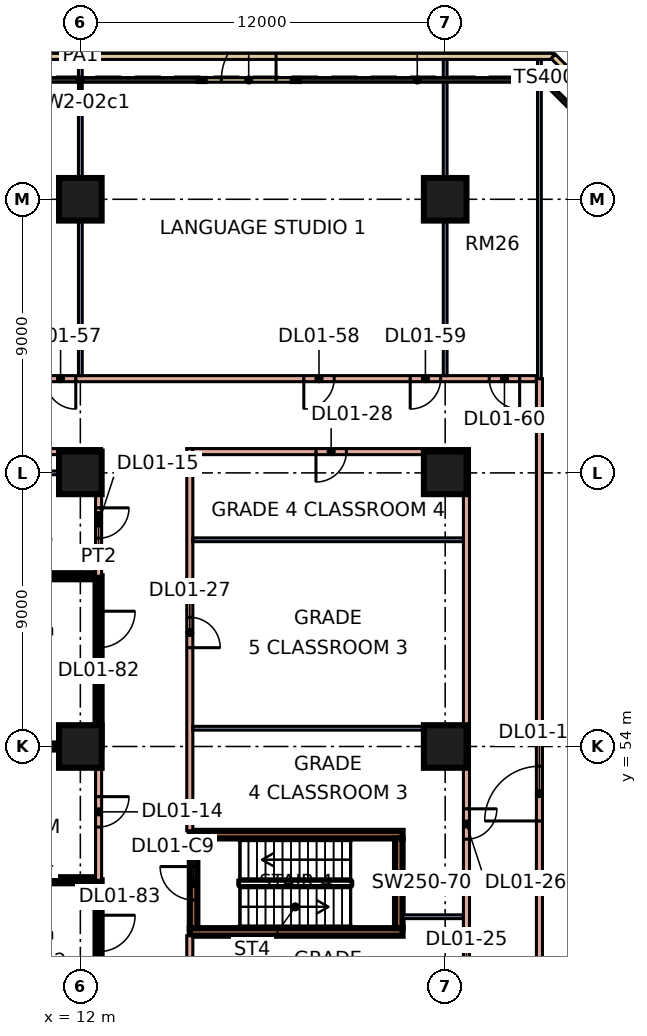
"""IFC4 building model, lengths in metres.
Left out: names, types, materials, properties, quantities, classifications, styles, units other than length and angle.
Written with IfcOpenShell. Run it as: python <this file> out.ifc"""

import sys

from ifc_helpers import new_model, si_unit, direction, frame, frame_2d, origin, origin_2d, place, context, subcontext, project, spatial, rectangle, extrude, element, fill, save


model = new_model("IFC4")
c1 = context("Model", 3, precision=1e-05, world=origin(), true_north=direction((0.0, 1.0)))
c2 = subcontext(c1, "Body", "Model", "MODEL_VIEW")
j1 = project(units=[si_unit("LENGTHUNIT", "METRE"), si_unit("PLANEANGLEUNIT", "RADIAN")], contexts=[c1])
p1 = place(None, origin())
s1 = spatial("IfcSite", under=j1, at=p1, CompositionType="ELEMENT")
p2 = place(p1, origin())
s2 = spatial("IfcBuilding", under=s1, at=p2, CompositionType="ELEMENT")
p3 = place(p2, frame((0.0, 0.0, 7.2)))
s3 = spatial("IfcBuildingStorey", under=s2, at=p3, CompositionType="ELEMENT", Elevation=7.2)
for number, where, z_axis, x_axis in (
    (1, (12.0, 54.0, 0.0), (0.0, 0.0, 1.0), (1.0, 0.0, 0.0)),
    (2, (24.0, 54.0, 0.0), (0.0, 0.0, 1.0), (1.0, 0.0, 0.0)),
    (3, (12.0, 63.0, 0.0), (0.0, 0.0, 1.0), (1.0, 0.0, 0.0)),
    (4, (24.0, 63.0, 0.0), (0.0, 0.0, 1.0), (1.0, 0.0, 0.0)),
    (5, (12.0, 72.0, 0.0), (0.0, 0.0, 1.0), (1.0, 0.0, 0.0)),
    (6, (24.0, 72.0, 0.0), (0.0, 0.0, 1.0), (1.0, 0.0, 0.0)),
):
    element("IfcColumn", number, at=place(p3, frame(where, z_axis=z_axis, x_axis=x_axis)), inside=s3, PredefinedType="COLUMN", context=c2, shape_type="SweptSolid", body=[
        extrude(rectangle(XDim=1.4, YDim=1.4, at=origin_2d()), origin(), (0.0, 0.0, 1.0), 4.8),
    ])
for number, where, z_axis, x_axis in (
    (7, (15.6, 47.9, 0.0), (0.0, 0.0, 1.0), (1.0, 0.0, 0.0)),
    (8, (15.6, 51.1, 0.0), (0.0, 0.0, 1.0), (1.0, 0.0, 0.0)),
):
    element("IfcWall", number, at=place(p3, frame(where, z_axis=z_axis, x_axis=x_axis)), inside=s3, PredefinedType="SHEAR", context=c2, shape_type="SweptSolid", body=[
        extrude(rectangle(XDim=7.0, YDim=0.25, at=frame_2d((3.5, 0.0))), origin(), (0.0, 0.0, 1.0), 4.8),
    ])
p4 = place(p3, frame((15.725, 48.025, 0.0), z_axis=(0.0, 0.0, 1.0), x_axis=(0.0, 1.0, 0.0)))
e9 = element("IfcWall", 9, at=p4, inside=s3, PredefinedType="SHEAR", context=c2, shape_type="SweptSolid", body=[
    extrude(rectangle(XDim=2.95, YDim=0.25, at=frame_2d((1.475, 0.0))), origin(), (0.0, 0.0, 1.0), 4.8),
])
p5 = place(p4, frame((0.925, 0.0, 0.0)))
e10 = element("IfcOpeningElement", 10, at=p5, cuts=e9, PredefinedType="OPENING", context=c2, shape_type="SweptSolid", body=[
    extrude(rectangle(XDim=1.1, YDim=2.2, at=frame_2d((0.55, 1.1))), frame((0.0, 0.135, 0.0), z_axis=(0.0, -1.0, 0.0), x_axis=(1.0, 0.0, 0.0)), (0.0, 0.0, 1.0), 0.27),
])
p6 = place(p3, frame((22.475, 48.025, 0.0), z_axis=(0.0, 0.0, 1.0), x_axis=(0.0, 1.0, 0.0)))
e11 = element("IfcWall", 11, at=p6, inside=s3, PredefinedType="SHEAR", context=c2, shape_type="SweptSolid", body=[
    extrude(rectangle(XDim=2.95, YDim=0.25, at=frame_2d((1.475, 0.0))), origin(), (0.0, 0.0, 1.0), 4.8),
])
p7 = place(p3, frame((19.038, 75.925, 0.0), z_axis=(0.0, 0.0, 1.0), x_axis=(-1.0, 0.0, 0.0)))
e12 = element("IfcWall", 12, at=p7, inside=s3, PredefinedType="SOLIDWALL", context=c2, shape_type="SweptSolid", body=[
    extrude(rectangle(XDim=3.0, YDim=0.15, at=frame_2d((1.5, 0.0))), origin(), (0.0, 0.0, 1.0), 4.4),
])
p8 = place(p7, frame((0.6, 0.0, 0.0)))
e13 = element("IfcOpeningElement", 13, at=p8, cuts=e12, PredefinedType="OPENING", context=c2, shape_type="SweptSolid", body=[
    extrude(rectangle(XDim=1.8, YDim=2.4, at=frame_2d((0.9, 1.2))), frame((0.0, 0.085, 0.0), z_axis=(0.0, -1.0, 0.0), x_axis=(1.0, 0.0, 0.0)), (0.0, 0.0, 1.0), 0.17),
])
p9 = place(p3, frame((-3.553, 76.7, 0.0), z_axis=(0.0, 0.0, 1.0), x_axis=(1.0, 0.0, 0.0)))
e14 = element("IfcWall", 14, at=p9, inside=s3, PredefinedType="PARAPET", context=c2, shape_type="SweptSolid", body=[
    extrude(rectangle(XDim=31.107, YDim=0.2, at=frame_2d((15.553, 0.0))), origin(), (0.0, 0.0, 1.0), 0.5),
])
p10 = place(p3, frame((27.553, 76.7, 0.0), z_axis=(0.0, 0.0, 1.0), x_axis=(0.707106781187, -0.707106781187, 0.0)))
e15 = element("IfcWall", 15, at=p10, inside=s3, PredefinedType="PARAPET", context=c2, shape_type="SweptSolid", body=[
    extrude(rectangle(XDim=12.021, YDim=0.2, at=frame_2d((6.01, 0.0))), origin(), (0.0, 0.0, 1.0), 0.5),
])
p11 = place(p3, frame((-3.0, 66.1, 0.0), z_axis=(0.0, 0.0, 1.0), x_axis=(1.0, 0.0, 0.0)))
e16 = element("IfcWall", 16, at=p11, inside=s3, PredefinedType="PARTITIONING", context=c2, shape_type="SweptSolid", body=[
    extrude(rectangle(XDim=30.0, YDim=0.2, at=frame_2d((15.0, 0.0))), origin(), (0.0, 0.0, 1.0), 4.4),
])
p12 = place(p11, frame((0.65, 0.0, 0.0)))
e17 = element("IfcOpeningElement", 17, at=p12, cuts=e16, PredefinedType="OPENING", context=c2, shape_type="SweptSolid", body=[
    extrude(rectangle(XDim=1.0, YDim=2.1, at=frame_2d((0.5, 1.05))), frame((0.0, 0.11, 0.0), z_axis=(0.0, -1.0, 0.0), x_axis=(1.0, 0.0, 0.0)), (0.0, 0.0, 1.0), 0.22),
])
p13 = place(p11, frame((8.6, 0.0, 0.0)))
e18 = element("IfcOpeningElement", 18, at=p13, cuts=e16, PredefinedType="OPENING", context=c2, shape_type="SweptSolid", body=[
    extrude(rectangle(XDim=1.0, YDim=2.1, at=frame_2d((0.5, 1.05))), frame((0.0, 0.11, 0.0), z_axis=(0.0, -1.0, 0.0), x_axis=(1.0, 0.0, 0.0)), (0.0, 0.0, 1.0), 0.22),
])
p14 = place(p11, frame((13.85, 0.0, 0.0)))
e19 = element("IfcOpeningElement", 19, at=p14, cuts=e16, PredefinedType="OPENING", context=c2, shape_type="SweptSolid", body=[
    extrude(rectangle(XDim=1.0, YDim=2.1, at=frame_2d((0.5, 1.05))), frame((0.0, 0.11, 0.0), z_axis=(0.0, -1.0, 0.0), x_axis=(1.0, 0.0, 0.0)), (0.0, 0.0, 1.0), 0.22),
])
p15 = place(p11, frame((22.35, 0.0, 0.0)))
e20 = element("IfcOpeningElement", 20, at=p15, cuts=e16, PredefinedType="OPENING", context=c2, shape_type="SweptSolid", body=[
    extrude(rectangle(XDim=1.0, YDim=2.1, at=frame_2d((0.5, 1.05))), frame((0.0, 0.11, 0.0), z_axis=(0.0, -1.0, 0.0), x_axis=(1.0, 0.0, 0.0)), (0.0, 0.0, 1.0), 0.22),
])
p16 = place(p11, frame((25.85, 0.0, 0.0)))
e21 = element("IfcOpeningElement", 21, at=p16, cuts=e16, PredefinedType="OPENING", context=c2, shape_type="SweptSolid", body=[
    extrude(rectangle(XDim=1.0, YDim=2.1, at=frame_2d((0.5, 1.05))), frame((0.0, 0.11, 0.0), z_axis=(0.0, -1.0, 0.0), x_axis=(1.0, 0.0, 0.0)), (0.0, 0.0, 1.0), 0.22),
])
p17 = place(p11, frame((28.45, 0.0, 0.0)))
e22 = element("IfcOpeningElement", 22, at=p17, cuts=e16, PredefinedType="OPENING", context=c2, shape_type="SweptSolid", body=[
    extrude(rectangle(XDim=1.0, YDim=2.1, at=frame_2d((0.5, 1.05))), frame((0.0, 0.11, 0.0), z_axis=(0.0, -1.0, 0.0), x_axis=(1.0, 0.0, 0.0)), (0.0, 0.0, 1.0), 0.22),
])
for number, where, z_axis, x_axis in (
    (23, (-0.6, 49.6, 0.0), (0.0, 0.0, 1.0), (1.0, 0.0, 0.0)),
    (24, (-0.6, 54.0, 0.0), (0.0, 0.0, 1.0), (1.0, 0.0, 0.0)),
    (25, (-0.6, 59.6, 0.0), (0.0, 0.0, 1.0), (1.0, 0.0, 0.0)),
):
    element("IfcWall", number, at=place(p3, frame(where, z_axis=z_axis, x_axis=x_axis)), inside=s3, PredefinedType="SOLIDWALL", context=c2, shape_type="SweptSolid", body=[
        extrude(rectangle(XDim=13.1, YDim=0.2, at=frame_2d((6.55, 0.0))), origin(), (0.0, 0.0, 1.0), 4.4),
    ])
p18 = place(p3, frame((-0.6, 63.7, 0.0), z_axis=(0.0, 0.0, 1.0), x_axis=(1.0, 0.0, 0.0)))
e26 = element("IfcWall", 26, at=p18, inside=s3, PredefinedType="PARTITIONING", context=c2, shape_type="SweptSolid", body=[
    extrude(rectangle(XDim=13.3, YDim=0.2, at=frame_2d((6.65, 0.0))), origin(), (0.0, 0.0, 1.0), 4.4),
])
p19 = place(p18, frame((6.05, 0.0, 0.0)))
e27 = element("IfcOpeningElement", 27, at=p19, cuts=e26, PredefinedType="OPENING", context=c2, shape_type="SweptSolid", body=[
    extrude(rectangle(XDim=1.0, YDim=2.1, at=frame_2d((0.5, 1.05))), frame((0.0, 0.11, 0.0), z_axis=(0.0, -1.0, 0.0), x_axis=(1.0, 0.0, 0.0)), (0.0, 0.0, 1.0), 0.22),
])
p20 = place(p3, frame((5.938, 63.0, 0.0), z_axis=(0.0, 0.0, 1.0), x_axis=(1.0, 0.0, 0.0)))
e28 = element("IfcWall", 28, at=p20, inside=s3, PredefinedType="PARTITIONING", context=c2, shape_type="SweptSolid", body=[
    extrude(rectangle(XDim=6.562, YDim=0.125, at=frame_2d((3.281, 0.0))), origin(), (0.0, 0.0, 1.0), 4.4),
])
p21 = place(p3, frame((12.0, 66.2, 0.0), z_axis=(0.0, 0.0, 1.0), x_axis=(0.0, 1.0, 0.0)))
e29 = element("IfcWall", 29, at=p21, inside=s3, PredefinedType="PARTITIONING", context=c2, shape_type="SweptSolid", body=[
    extrude(rectangle(XDim=10.4, YDim=0.125, at=frame_2d((5.2, 0.0))), origin(), (0.0, 0.0, 1.0), 4.4),
])
p22 = place(p3, frame((12.6, 45.0, 0.0), z_axis=(0.0, 0.0, 1.0), x_axis=(0.0, 1.0, 0.0)))
e30 = element("IfcWall", 30, at=p22, inside=s3, PredefinedType="SOLIDWALL", context=c2, shape_type="SweptSolid", body=[
    extrude(rectangle(XDim=4.6, YDim=0.2, at=frame_2d((2.3, 0.0))), origin(), (0.0, 0.0, 1.0), 4.4),
])
p23 = place(p22, frame((2.25, 0.0, 0.0)))
e31 = element("IfcOpeningElement", 31, at=p23, cuts=e30, PredefinedType="OPENING", context=c2, shape_type="SweptSolid", body=[
    extrude(rectangle(XDim=1.2, YDim=2.1, at=frame_2d((0.6, 1.05))), frame((0.0, 0.11, 0.0), z_axis=(0.0, -1.0, 0.0), x_axis=(1.0, 0.0, 0.0)), (0.0, 0.0, 1.0), 0.22),
])
p24 = place(p3, frame((12.6, 49.6, 0.0), z_axis=(0.0, 0.0, 1.0), x_axis=(0.0, 1.0, 0.0)))
e32 = element("IfcWall", 32, at=p24, inside=s3, PredefinedType="PARTITIONING", context=c2, shape_type="SweptSolid", body=[
    extrude(rectangle(XDim=4.4, YDim=0.2, at=frame_2d((2.2, 0.0))), origin(), (0.0, 0.0, 1.0), 4.4),
])
p25 = place(p24, frame((1.75, 0.0, 0.0)))
e33 = element("IfcOpeningElement", 33, at=p25, cuts=e32, PredefinedType="OPENING", context=c2, shape_type="SweptSolid", body=[
    extrude(rectangle(XDim=1.0, YDim=2.1, at=frame_2d((0.5, 1.05))), frame((0.0, 0.11, 0.0), z_axis=(0.0, -1.0, 0.0), x_axis=(1.0, 0.0, 0.0)), (0.0, 0.0, 1.0), 0.22),
])
p26 = place(p3, frame((12.6, 54.0, 0.0), z_axis=(0.0, 0.0, 1.0), x_axis=(0.0, 1.0, 0.0)))
e34 = element("IfcWall", 34, at=p26, inside=s3, PredefinedType="SOLIDWALL", context=c2, shape_type="SweptSolid", body=[
    extrude(rectangle(XDim=5.6, YDim=0.2, at=frame_2d((2.8, 0.0))), origin(), (0.0, 0.0, 1.0), 4.4),
])
p27 = place(p26, frame((3.25, 0.0, 0.0)))
e35 = element("IfcOpeningElement", 35, at=p27, cuts=e34, PredefinedType="OPENING", context=c2, shape_type="SweptSolid", body=[
    extrude(rectangle(XDim=1.2, YDim=2.1, at=frame_2d((0.6, 1.05))), frame((0.0, 0.11, 0.0), z_axis=(0.0, -1.0, 0.0), x_axis=(1.0, 0.0, 0.0)), (0.0, 0.0, 1.0), 0.22),
])
p28 = place(p3, frame((12.6, 59.6, 0.0), z_axis=(0.0, 0.0, 1.0), x_axis=(0.0, 1.0, 0.0)))
e36 = element("IfcWall", 36, at=p28, inside=s3, PredefinedType="PARTITIONING", context=c2, shape_type="SweptSolid", body=[
    extrude(rectangle(XDim=4.0, YDim=0.2, at=frame_2d((2.0, 0.0))), origin(), (0.0, 0.0, 1.0), 4.4),
])
p29 = place(p28, frame((1.25, 0.0, 0.0)))
e37 = element("IfcOpeningElement", 37, at=p29, cuts=e36, PredefinedType="OPENING", context=c2, shape_type="SweptSolid", body=[
    extrude(rectangle(XDim=1.0, YDim=2.1, at=frame_2d((0.5, 1.05))), frame((0.0, 0.11, 0.0), z_axis=(0.0, -1.0, 0.0), x_axis=(1.0, 0.0, 0.0)), (0.0, 0.0, 1.0), 0.22),
])
p30 = place(p3, frame((15.6, 44.2, 0.0), z_axis=(0.0, 0.0, 1.0), x_axis=(0.0, 1.0, 0.0)))
e38 = element("IfcWall", 38, at=p30, inside=s3, PredefinedType="PARTITIONING", context=c2, shape_type="SweptSolid", body=[
    extrude(rectangle(XDim=3.575, YDim=0.2, at=frame_2d((1.788, 0.0))), origin(), (0.0, 0.0, 1.0), 4.4),
])
p31 = place(p3, frame((15.6, 51.225, 0.0), z_axis=(0.0, 0.0, 1.0), x_axis=(0.0, 1.0, 0.0)))
e39 = element("IfcWall", 39, at=p31, inside=s3, PredefinedType="PARTITIONING", context=c2, shape_type="SweptSolid", body=[
    extrude(rectangle(XDim=12.575, YDim=0.2, at=frame_2d((6.288, 0.0))), origin(), (0.0, 0.0, 1.0), 4.4),
])
p32 = place(p31, frame((6.025, 0.0, 0.0)))
e40 = element("IfcOpeningElement", 40, at=p32, cuts=e39, PredefinedType="OPENING", context=c2, shape_type="SweptSolid", body=[
    extrude(rectangle(XDim=1.0, YDim=2.1, at=frame_2d((0.5, 1.05))), frame((0.0, 0.11, 0.0), z_axis=(0.0, -1.0, 0.0), x_axis=(1.0, 0.0, 0.0)), (0.0, 0.0, 1.0), 0.22),
])
for number, where, z_axis, x_axis in (
    (41, (15.7, 54.6, 0.0), (0.0, 0.0, 1.0), (1.0, 0.0, 0.0)),
    (42, (15.7, 60.8, 0.0), (0.0, 0.0, 1.0), (1.0, 0.0, 0.0)),
):
    element("IfcWall", number, at=place(p3, frame(where, z_axis=z_axis, x_axis=x_axis)), inside=s3, PredefinedType="PARTITIONING", context=c2, shape_type="SweptSolid", body=[
        extrude(rectangle(XDim=8.9, YDim=0.125, at=frame_2d((4.45, 0.0))), origin(), (0.0, 0.0, 1.0), 4.4),
    ])
p33 = place(p3, frame((15.7, 63.7, 0.0), z_axis=(0.0, 0.0, 1.0), x_axis=(1.0, 0.0, 0.0)))
e43 = element("IfcWall", 43, at=p33, inside=s3, PredefinedType="PARTITIONING", context=c2, shape_type="SweptSolid", body=[
    extrude(rectangle(XDim=8.9, YDim=0.2, at=frame_2d((4.45, 0.0))), origin(), (0.0, 0.0, 1.0), 4.4),
])
p34 = place(p33, frame((4.05, 0.0, 0.0)))
e44 = element("IfcOpeningElement", 44, at=p34, cuts=e43, PredefinedType="OPENING", context=c2, shape_type="SweptSolid", body=[
    extrude(rectangle(XDim=1.0, YDim=2.1, at=frame_2d((0.5, 1.05))), frame((0.0, 0.11, 0.0), z_axis=(0.0, -1.0, 0.0), x_axis=(1.0, 0.0, 0.0)), (0.0, 0.0, 1.0), 0.22),
])
p35 = place(p3, frame((22.6, 48.4, 0.0), z_axis=(0.0, 0.0, 1.0), x_axis=(1.0, 0.0, 0.0)))
e45 = element("IfcWall", 45, at=p35, inside=s3, PredefinedType="PARTITIONING", context=c2, shape_type="SweptSolid", body=[
    extrude(rectangle(XDim=2.0, YDim=0.125, at=frame_2d((1.0, 0.0))), origin(), (0.0, 0.0, 1.0), 4.4),
])
p36 = place(p3, frame((24.0, 66.2, 0.0), z_axis=(0.0, 0.0, 1.0), x_axis=(0.0, 1.0, 0.0)))
e46 = element("IfcWall", 46, at=p36, inside=s3, PredefinedType="PARTITIONING", context=c2, shape_type="SweptSolid", body=[
    extrude(rectangle(XDim=10.4, YDim=0.125, at=frame_2d((5.2, 0.0))), origin(), (0.0, 0.0, 1.0), 4.4),
])
p37 = place(p3, frame((24.7, 44.3, 0.0), z_axis=(0.0, 0.0, 1.0), x_axis=(0.0, 1.0, 0.0)))
e47 = element("IfcWall", 47, at=p37, inside=s3, PredefinedType="PARTITIONING", context=c2, shape_type="SweptSolid", body=[
    extrude(rectangle(XDim=19.5, YDim=0.2, at=frame_2d((9.75, 0.0))), origin(), (0.0, 0.0, 1.0), 4.4),
])
p38 = place(p37, frame((1.45, 0.0, 0.0)))
e48 = element("IfcOpeningElement", 48, at=p38, cuts=e47, PredefinedType="OPENING", context=c2, shape_type="SweptSolid", body=[
    extrude(rectangle(XDim=1.0, YDim=2.1, at=frame_2d((0.5, 1.05))), frame((0.0, 0.11, 0.0), z_axis=(0.0, -1.0, 0.0), x_axis=(1.0, 0.0, 0.0)), (0.0, 0.0, 1.0), 0.22),
])
p39 = place(p37, frame((6.65, 0.0, 0.0)))
e49 = element("IfcOpeningElement", 49, at=p39, cuts=e47, PredefinedType="OPENING", context=c2, shape_type="SweptSolid", body=[
    extrude(rectangle(XDim=1.0, YDim=2.1, at=frame_2d((0.5, 1.05))), frame((0.0, 0.11, 0.0), z_axis=(0.0, -1.0, 0.0), x_axis=(1.0, 0.0, 0.0)), (0.0, 0.0, 1.0), 0.22),
])
p40 = place(p3, frame((27.1, 38.5, 0.0), z_axis=(0.0, 0.0, 1.0), x_axis=(0.0, 1.0, 0.0)))
e50 = element("IfcWall", 50, at=p40, inside=s3, PredefinedType="PARTITIONING", context=c2, shape_type="SweptSolid", body=[
    extrude(rectangle(XDim=27.6, YDim=0.2, at=frame_2d((13.8, 0.0))), origin(), (0.0, 0.0, 1.0), 4.4),
])
p41 = place(p40, frame((13.05, 0.0, 0.0)))
e51 = element("IfcOpeningElement", 51, at=p41, cuts=e50, PredefinedType="OPENING", context=c2, shape_type="SweptSolid", body=[
    extrude(rectangle(XDim=1.8, YDim=2.1, at=frame_2d((0.9, 1.05))), frame((0.0, 0.11, 0.0), z_axis=(0.0, -1.0, 0.0), x_axis=(1.0, 0.0, 0.0)), (0.0, 0.0, 1.0), 0.22),
])
p42 = place(p40, frame((3.05, 0.0, 0.0)))
e52 = element("IfcOpeningElement", 52, at=p42, cuts=e50, PredefinedType="OPENING", context=c2, shape_type="SweptSolid", body=[
    extrude(rectangle(XDim=1.8, YDim=2.1, at=frame_2d((0.9, 1.05))), frame((0.0, 0.11, 0.0), z_axis=(0.0, -1.0, 0.0), x_axis=(1.0, 0.0, 0.0)), (0.0, 0.0, 1.0), 0.22),
])
p43 = place(p3, frame((27.1, 66.1, 0.0), z_axis=(0.0, 0.0, 1.0), x_axis=(0.0, 1.0, 0.0)))
e53 = element("IfcWall", 53, at=p43, inside=s3, PredefinedType="PARTITIONING", context=c2, shape_type="SweptSolid", body=[
    extrude(rectangle(XDim=10.5, YDim=0.125, at=frame_2d((5.25, 0.0))), origin(), (0.0, 0.0, 1.0), 4.4),
])
p44 = place(p8, frame((1.8, 0.0, 0.0), z_axis=(0.0, 0.0, 1.0), x_axis=(-1.0, 0.0, 0.0)))
e54 = element("IfcDoor", 54, at=p44, inside=s3, OperationType="DOUBLE_DOOR_SINGLE_SWING", PredefinedType="DOOR", context=c2, shape_type="SweptSolid", body=[
    extrude(rectangle(XDim=1.8, YDim=2.4, at=frame_2d((0.9, 1.2))), frame((0.0, 0.025, 0.0), z_axis=(0.0, -1.0, 0.0), x_axis=(1.0, 0.0, 0.0)), (0.0, 0.0, 1.0), 0.05),
])
fill(e13, e54)
p45 = place(p5, frame((1.1, 0.0, 0.0), z_axis=(0.0, 0.0, 1.0), x_axis=(-1.0, 0.0, 0.0)))
e55 = element("IfcDoor", 55, at=p45, inside=s3, OperationType="SINGLE_SWING_RIGHT", PredefinedType="DOOR", context=c2, shape_type="SweptSolid", body=[
    extrude(rectangle(XDim=1.1, YDim=2.2, at=frame_2d((0.55, 1.1))), frame((0.0, 0.025, 0.0), z_axis=(0.0, -1.0, 0.0), x_axis=(1.0, 0.0, 0.0)), (0.0, 0.0, 1.0), 0.05),
])
fill(e10, e55)
p46 = place(p25, origin())
e56 = element("IfcDoor", 56, at=p46, inside=s3, OperationType="SINGLE_SWING_RIGHT", PredefinedType="DOOR", context=c2, shape_type="SweptSolid", body=[
    extrude(rectangle(XDim=1.0, YDim=2.1, at=frame_2d((0.5, 1.05))), frame((0.0, 0.025, 0.0), z_axis=(0.0, -1.0, 0.0), x_axis=(1.0, 0.0, 0.0)), (0.0, 0.0, 1.0), 0.05),
])
fill(e33, e56)
p47 = place(p29, origin())
e57 = element("IfcDoor", 57, at=p47, inside=s3, OperationType="SINGLE_SWING_RIGHT", PredefinedType="DOOR", context=c2, shape_type="SweptSolid", body=[
    extrude(rectangle(XDim=1.0, YDim=2.1, at=frame_2d((0.5, 1.05))), frame((0.0, 0.025, 0.0), z_axis=(0.0, -1.0, 0.0), x_axis=(1.0, 0.0, 0.0)), (0.0, 0.0, 1.0), 0.05),
])
fill(e37, e57)
p48 = place(p41, origin())
e58 = element("IfcDoor", 58, at=p48, inside=s3, OperationType="DOUBLE_DOOR_SINGLE_SWING", PredefinedType="DOOR", context=c2, shape_type="SweptSolid", body=[
    extrude(rectangle(XDim=1.8, YDim=2.1, at=frame_2d((0.9, 1.05))), frame((0.0, 0.025, 0.0), z_axis=(0.0, -1.0, 0.0), x_axis=(1.0, 0.0, 0.0)), (0.0, 0.0, 1.0), 0.05),
])
fill(e51, e58)
p49 = place(p39, origin())
e59 = element("IfcDoor", 59, at=p49, inside=s3, OperationType="SINGLE_SWING_RIGHT", PredefinedType="DOOR", context=c2, shape_type="SweptSolid", body=[
    extrude(rectangle(XDim=1.0, YDim=2.1, at=frame_2d((0.5, 1.05))), frame((0.0, 0.025, 0.0), z_axis=(0.0, -1.0, 0.0), x_axis=(1.0, 0.0, 0.0)), (0.0, 0.0, 1.0), 0.05),
])
fill(e49, e59)
p50 = place(p32, frame((1.0, 0.0, 0.0), z_axis=(0.0, 0.0, 1.0), x_axis=(-1.0, 0.0, 0.0)))
e60 = element("IfcDoor", 60, at=p50, inside=s3, OperationType="SINGLE_SWING_LEFT", PredefinedType="DOOR", context=c2, shape_type="SweptSolid", body=[
    extrude(rectangle(XDim=1.0, YDim=2.1, at=frame_2d((0.5, 1.05))), frame((0.0, 0.025, 0.0), z_axis=(0.0, -1.0, 0.0), x_axis=(1.0, 0.0, 0.0)), (0.0, 0.0, 1.0), 0.05),
])
fill(e40, e60)
p51 = place(p34, frame((1.0, 0.0, 0.0), z_axis=(0.0, 0.0, 1.0), x_axis=(-1.0, 0.0, 0.0)))
e61 = element("IfcDoor", 61, at=p51, inside=s3, OperationType="SINGLE_SWING_LEFT", PredefinedType="DOOR", context=c2, shape_type="SweptSolid", body=[
    extrude(rectangle(XDim=1.0, YDim=2.1, at=frame_2d((0.5, 1.05))), frame((0.0, 0.025, 0.0), z_axis=(0.0, -1.0, 0.0), x_axis=(1.0, 0.0, 0.0)), (0.0, 0.0, 1.0), 0.05),
])
fill(e44, e61)
p52 = place(p14, origin())
e62 = element("IfcDoor", 62, at=p52, inside=s3, OperationType="SINGLE_SWING_RIGHT", PredefinedType="DOOR", context=c2, shape_type="SweptSolid", body=[
    extrude(rectangle(XDim=1.0, YDim=2.1, at=frame_2d((0.5, 1.05))), frame((0.0, 0.025, 0.0), z_axis=(0.0, -1.0, 0.0), x_axis=(1.0, 0.0, 0.0)), (0.0, 0.0, 1.0), 0.05),
])
fill(e19, e62)
p53 = place(p15, frame((1.0, 0.0, 0.0), z_axis=(0.0, 0.0, 1.0), x_axis=(-1.0, 0.0, 0.0)))
e63 = element("IfcDoor", 63, at=p53, inside=s3, OperationType="SINGLE_SWING_LEFT", PredefinedType="DOOR", context=c2, shape_type="SweptSolid", body=[
    extrude(rectangle(XDim=1.0, YDim=2.1, at=frame_2d((0.5, 1.05))), frame((0.0, 0.025, 0.0), z_axis=(0.0, -1.0, 0.0), x_axis=(1.0, 0.0, 0.0)), (0.0, 0.0, 1.0), 0.05),
])
fill(e20, e63)
p54 = place(p16, frame((1.0, 0.0, 0.0), z_axis=(0.0, 0.0, 1.0), x_axis=(-1.0, 0.0, 0.0)))
e64 = element("IfcDoor", 64, at=p54, inside=s3, OperationType="SINGLE_SWING_LEFT", PredefinedType="DOOR", context=c2, shape_type="SweptSolid", body=[
    extrude(rectangle(XDim=1.0, YDim=2.1, at=frame_2d((0.5, 1.05))), frame((0.0, 0.025, 0.0), z_axis=(0.0, -1.0, 0.0), x_axis=(1.0, 0.0, 0.0)), (0.0, 0.0, 1.0), 0.05),
])
fill(e21, e64)
p55 = place(p17, origin())
e65 = element("IfcDoor", 65, at=p55, inside=s3, OperationType="SINGLE_SWING_RIGHT", PredefinedType="DOOR", context=c2, shape_type="SweptSolid", body=[
    extrude(rectangle(XDim=1.0, YDim=2.1, at=frame_2d((0.5, 1.05))), frame((0.0, 0.025, 0.0), z_axis=(0.0, -1.0, 0.0), x_axis=(1.0, 0.0, 0.0)), (0.0, 0.0, 1.0), 0.05),
])
fill(e22, e65)
p56 = place(p27, origin())
e66 = element("IfcDoor", 66, at=p56, inside=s3, OperationType="SINGLE_SWING_RIGHT", PredefinedType="DOOR", context=c2, shape_type="SweptSolid", body=[
    extrude(rectangle(XDim=1.2, YDim=2.1, at=frame_2d((0.6, 1.05))), frame((0.0, 0.025, 0.0), z_axis=(0.0, -1.0, 0.0), x_axis=(1.0, 0.0, 0.0)), (0.0, 0.0, 1.0), 0.05),
])
fill(e35, e66)
p57 = place(p23, origin())
e67 = element("IfcDoor", 67, at=p57, inside=s3, OperationType="SINGLE_SWING_RIGHT", PredefinedType="DOOR", context=c2, shape_type="SweptSolid", body=[
    extrude(rectangle(XDim=1.2, YDim=2.1, at=frame_2d((0.6, 1.05))), frame((0.0, 0.025, 0.0), z_axis=(0.0, -1.0, 0.0), x_axis=(1.0, 0.0, 0.0)), (0.0, 0.0, 1.0), 0.05),
])
fill(e31, e67)
save(model, sys.argv[1])
